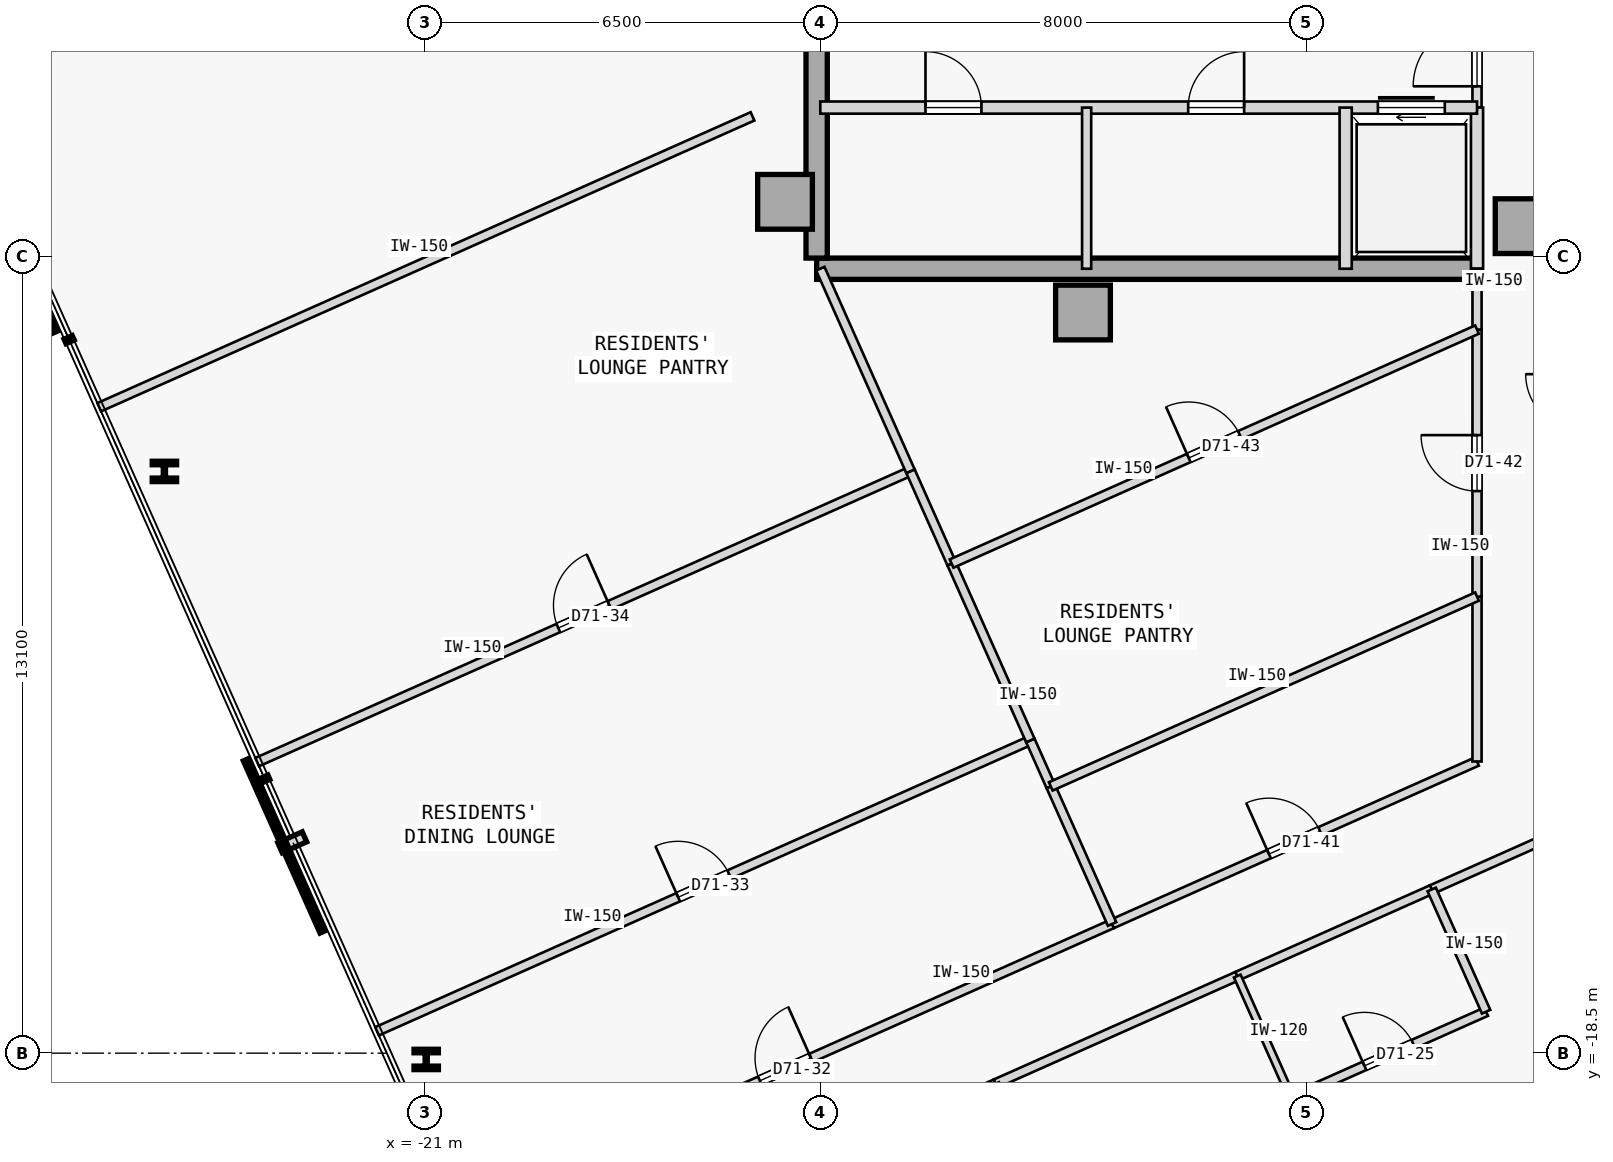
"""IFC4 building model, lengths in metres.
Left out: names, types, materials, properties, quantities, classifications, styles, units other than length and angle.
Written with IfcOpenShell. Run it as: python <this file> out.ifc"""

import sys

from ifc_helpers import new_model, si_unit, direction, frame, frame_2d, origin, origin_2d, place, context, subcontext, project, spatial, rectangle, i_section, extrude, element, fill, save


model = new_model("IFC4")
c1 = context("Model", 3, precision=1e-05, world=origin(), true_north=direction((0.0, 1.0)))
c2 = subcontext(c1, "Body", "Model", "MODEL_VIEW")
j1 = project(units=[si_unit("LENGTHUNIT", "METRE"), si_unit("PLANEANGLEUNIT", "RADIAN")], contexts=[c1])
p1 = place(None, origin())
s1 = spatial("IfcSite", under=j1, at=p1, CompositionType="ELEMENT")
p2 = place(p1, origin())
s2 = spatial("IfcBuilding", under=s1, at=p2, CompositionType="ELEMENT")
p3 = place(p2, frame((0.0, 0.0, 265.55)))
s3 = spatial("IfcBuildingStorey", under=s2, at=p3, CompositionType="ELEMENT", Elevation=265.55)
for number, where, z_axis, x_axis in (
    (1, (-15.08, -4.5, 0.0), (0.0, 0.0, 1.0), (1.0, 0.0, 0.0)),
    (2, (-10.18, -6.32, 0.0), (0.0, 0.0, 1.0), (1.0, 0.0, 0.0)),
    (3, (-2.95, -4.9, 0.0), (0.0, 0.0, 1.0), (1.0, 0.0, 0.0)),
):
    element("IfcColumn", number, at=place(p3, frame(where, z_axis=z_axis, x_axis=x_axis)), inside=s3, PredefinedType="COLUMN", context=c2, shape_type="SweptSolid", body=[
        extrude(rectangle(XDim=0.9, YDim=0.9, at=origin_2d()), origin(), (0.0, 0.0, 1.0), 3.35),
    ])
p4 = place(p3, frame((-14.56, -5.6, 0.0), z_axis=(0.0, 0.0, 1.0), x_axis=(1.0, 0.0, 0.0)))
e4 = element("IfcWall", 4, at=p4, inside=s3, PredefinedType="SHEAR", context=c2, shape_type="SweptSolid", body=[
    extrude(rectangle(XDim=10.86, YDim=0.35, at=frame_2d((5.43, 0.0))), origin(), (0.0, 0.0, 1.0), 3.125),
])
p5 = place(p3, frame((-14.56, -5.425, 0.0), z_axis=(0.0, 0.0, 1.0), x_axis=(0.0, 1.0, 0.0)))
e5 = element("IfcWall", 5, at=p5, inside=s3, PredefinedType="SHEAR", context=c2, shape_type="SweptSolid", body=[
    extrude(rectangle(XDim=10.85, YDim=0.35, at=frame_2d((5.425, 0.0))), origin(), (0.0, 0.0, 1.0), 3.125),
])
for number, where, z_axis, x_axis in (
    (6, (-25.286, -8.933, 0.0), (0.0, 0.0, 1.0), (1.0, 0.0, 0.0)),
    (7, (-20.981, -18.603, 0.0), (0.0, 0.0, 1.0), (1.0, 0.0, 0.0)),
):
    element("IfcColumn", number, at=place(p3, frame(where, z_axis=z_axis, x_axis=x_axis)), inside=s3, PredefinedType="COLUMN", context=c2, shape_type="SweptSolid", body=[
        extrude(i_section(OverallWidth=0.401, OverallDepth=0.335, WebThickness=0.036, FlangeThickness=0.058, FilletRadius=0.015, at=origin_2d()), origin(), (0.0, 0.0, 1.0), 3.35),
    ])
p6 = place(p3, frame((-3.7, -2.95, 0.0), z_axis=(0.0, 0.0, 1.0), x_axis=(0.0, 1.0, 0.0)))
e8 = element("IfcWall", 8, at=p6, inside=s3, PredefinedType="PARTITIONING", context=c2, shape_type="SweptSolid", body=[
    extrude(rectangle(XDim=1.8, YDim=0.15, at=frame_2d((0.9, 0.0))), origin(), (0.0, 0.0, 1.0), 3.125),
])
p7 = place(p6, frame((0.35, 0.0, 0.0)))
e9 = element("IfcOpeningElement", 9, at=p7, cuts=e8, PredefinedType="OPENING", context=c2, shape_type="SweptSolid", body=[
    extrude(rectangle(XDim=1.05, YDim=2.18, at=frame_2d((0.525, 1.09))), frame((0.0, 0.085, 0.0), z_axis=(0.0, -1.0, 0.0), x_axis=(1.0, 0.0, 0.0)), (0.0, 0.0, 1.0), 0.17),
])
p8 = place(p3, frame((-3.7, -5.6, 0.0), z_axis=(0.0, 0.0, 1.0), x_axis=(0.0, 1.0, 0.0)))
e10 = element("IfcWall", 10, at=p8, inside=s3, PredefinedType="STANDARD", context=c2, shape_type="SweptSolid", body=[
    extrude(rectangle(XDim=2.65, YDim=0.2, at=frame_2d((1.325, 0.0))), origin(), (0.0, 0.0, 1.0), 3.125),
])
p9 = place(p3, frame((-14.5, -2.95, 0.0), z_axis=(0.0, 0.0, 1.0), x_axis=(1.0, 0.0, 0.0)))
e11 = element("IfcWall", 11, at=p9, inside=s3, PredefinedType="STANDARD", context=c2, shape_type="SweptSolid", body=[
    extrude(rectangle(XDim=10.8, YDim=0.2, at=frame_2d((5.4, 0.0))), origin(), (0.0, 0.0, 1.0), 3.125),
])
p10 = place(p9, frame((9.17, 0.0, 0.0)))
e12 = element("IfcOpeningElement", 12, at=p10, cuts=e11, PredefinedType="OPENING", context=c2, shape_type="SweptSolid", body=[
    extrude(rectangle(XDim=1.1, YDim=2.15, at=frame_2d((0.55, 1.075))), frame((0.0, 0.11, 0.0), z_axis=(0.0, -1.0, 0.0), x_axis=(1.0, 0.0, 0.0)), (0.0, 0.0, 1.0), 0.22),
])
p11 = place(p9, frame((1.73, 0.0, 0.0)))
e13 = element("IfcOpeningElement", 13, at=p11, cuts=e11, PredefinedType="OPENING", context=c2, shape_type="SweptSolid", body=[
    extrude(rectangle(XDim=0.92, YDim=2.15, at=frame_2d((0.46, 1.075))), frame((0.0, 0.11, 0.0), z_axis=(0.0, -1.0, 0.0), x_axis=(1.0, 0.0, 0.0)), (0.0, 0.0, 1.0), 0.22),
])
p12 = place(p9, frame((6.05, 0.0, 0.0)))
e14 = element("IfcOpeningElement", 14, at=p12, cuts=e11, PredefinedType="OPENING", context=c2, shape_type="SweptSolid", body=[
    extrude(rectangle(XDim=0.92, YDim=2.15, at=frame_2d((0.46, 1.075))), frame((0.0, 0.11, 0.0), z_axis=(0.0, -1.0, 0.0), x_axis=(1.0, 0.0, 0.0)), (0.0, 0.0, 1.0), 0.22),
])
p13 = place(p3, frame((-5.86, -5.6, 0.0), z_axis=(0.0, 0.0, 1.0), x_axis=(0.0, 1.0, 0.0)))
e15 = element("IfcWall", 15, at=p13, inside=s3, PredefinedType="STANDARD", context=c2, shape_type="SweptSolid", body=[
    extrude(rectangle(XDim=2.65, YDim=0.2, at=frame_2d((1.325, 0.0))), origin(), (0.0, 0.0, 1.0), 3.125),
])
p14 = place(p3, frame((-10.12, -5.6, 0.0), z_axis=(0.0, 0.0, 1.0), x_axis=(0.0, 1.0, 0.0)))
e16 = element("IfcWall", 16, at=p14, inside=s3, PredefinedType="PARTITIONING", context=c2, shape_type="SweptSolid", body=[
    extrude(rectangle(XDim=2.65, YDim=0.15, at=frame_2d((1.325, 0.0))), origin(), (0.0, 0.0, 1.0), 3.125),
])
p15 = place(p3, frame((-4.445, -15.808, 0.0), z_axis=(0.0, 0.0, 1.0), x_axis=(0.913546853922, 0.406733506966, 0.0)))
e17 = element("IfcWall", 17, at=p15, inside=s3, PredefinedType="PARTITIONING", context=c2, shape_type="SweptSolid", body=[
    extrude(rectangle(XDim=12.751, YDim=0.15, at=frame_2d((6.375, 0.0))), origin(), (0.0, 0.0, 1.0), 3.125),
])
p16 = place(p15, frame((5.9, 0.0, 0.0)))
e18 = element("IfcOpeningElement", 18, at=p16, cuts=e17, PredefinedType="OPENING", context=c2, shape_type="SweptSolid", body=[
    extrude(rectangle(XDim=0.95, YDim=2.15, at=frame_2d((0.475, 1.075))), frame((0.0, 0.085, 0.0), z_axis=(0.0, -1.0, 0.0), x_axis=(1.0, 0.0, 0.0)), (0.0, 0.0, 1.0), 0.17),
])
p17 = place(p3, frame((-13.763, -19.957, 0.0), z_axis=(0.0, 0.0, 1.0), x_axis=(0.913541436194, 0.406745675276, 0.0)))
e19 = element("IfcWall", 19, at=p17, inside=s3, PredefinedType="PARTITIONING", context=c2, shape_type="SweptSolid", body=[
    extrude(rectangle(XDim=2.35, YDim=0.15, at=frame_2d((1.175, 0.0))), origin(), (0.0, 0.0, 1.0), 3.125),
])
p18 = place(p3, frame((-11.616, -19.001, 0.0), z_axis=(0.0, 0.0, 1.0), x_axis=(0.913545193015, 0.406737237438, 0.0)))
e20 = element("IfcWall", 20, at=p18, inside=s3, PredefinedType="PARTITIONING", context=c2, shape_type="SweptSolid", body=[
    extrude(rectangle(XDim=4.35, YDim=0.15, at=frame_2d((2.175, 0.0))), origin(), (0.0, 0.0, 1.0), 3.125),
])
p19 = place(p3, frame((-7.643, -17.232, 0.0), z_axis=(0.0, 0.0, 1.0), x_axis=(0.913549606868, 0.406727323635, 0.0)))
e21 = element("IfcWall", 21, at=p19, inside=s3, PredefinedType="PARTITIONING", context=c2, shape_type="SweptSolid", body=[
    extrude(rectangle(XDim=3.5, YDim=0.15, at=frame_2d((1.75, 0.0))), origin(), (0.0, 0.0, 1.0), 3.125),
])
p20 = place(p3, frame((-20.445, -21.159, 0.0), z_axis=(0.0, 0.0, 1.0), x_axis=(0.913547681516, 0.406731648137, 0.0)))
e22 = element("IfcWall", 22, at=p20, inside=s3, PredefinedType="PARTITIONING", context=c2, shape_type="SweptSolid", body=[
    extrude(rectangle(XDim=11.76, YDim=0.15, at=frame_2d((5.88, 0.0))), origin(), (0.0, 0.0, 1.0), 3.125),
])
p21 = place(p20, frame((5.42, 0.0, 0.0)))
e23 = element("IfcOpeningElement", 23, at=p21, cuts=e22, PredefinedType="OPENING", context=c2, shape_type="SweptSolid", body=[
    extrude(rectangle(XDim=0.92, YDim=2.15, at=frame_2d((0.46, 1.075))), frame((0.0, 0.085, 0.0), z_axis=(0.0, -1.0, 0.0), x_axis=(1.0, 0.0, 0.0)), (0.0, 0.0, 1.0), 0.17),
])
p22 = place(p3, frame((-9.702, -16.375, 0.0), z_axis=(0.0, 0.0, 1.0), x_axis=(0.913552389019, 0.406721074594, 0.0)))
e24 = element("IfcWall", 24, at=p22, inside=s3, PredefinedType="PARTITIONING", context=c2, shape_type="SweptSolid", body=[
    extrude(rectangle(XDim=6.57, YDim=0.15, at=frame_2d((3.285, 0.0))), origin(), (0.0, 0.0, 1.0), 3.125),
])
p23 = place(p22, frame((2.825, 0.0, 0.0)))
e25 = element("IfcOpeningElement", 25, at=p23, cuts=e24, PredefinedType="OPENING", context=c2, shape_type="SweptSolid", body=[
    extrude(rectangle(XDim=0.92, YDim=2.15, at=frame_2d((0.46, 1.075))), frame((0.0, 0.085, 0.0), z_axis=(0.0, -1.0, 0.0), x_axis=(1.0, 0.0, 0.0)), (0.0, 0.0, 1.0), 0.17),
])
p24 = place(p3, frame((-3.7, -13.703, 0.0), z_axis=(0.0, 0.0, 1.0), x_axis=(9.0033312e-05, 0.999999995947, 0.0)))
e26 = element("IfcWall", 26, at=p24, inside=s3, PredefinedType="PARTITIONING", context=c2, shape_type="SweptSolid", body=[
    extrude(rectangle(XDim=2.712, YDim=0.15, at=frame_2d((1.356, 0.0))), origin(), (0.0, 0.0, 1.0), 3.125),
])
p25 = place(p3, frame((-3.7, -10.992, 0.0), z_axis=(0.0, 0.0, 1.0), x_axis=(0.0, 1.0, 0.0)))
e27 = element("IfcWall", 27, at=p25, inside=s3, PredefinedType="PARTITIONING", context=c2, shape_type="SweptSolid", body=[
    extrude(rectangle(XDim=4.391, YDim=0.15, at=frame_2d((2.195, 0.0))), origin(), (0.0, 0.0, 1.0), 3.125),
])
p26 = place(p25, frame((1.735, 0.0, 0.0)))
e28 = element("IfcOpeningElement", 28, at=p26, cuts=e27, PredefinedType="OPENING", context=c2, shape_type="SweptSolid", body=[
    extrude(rectangle(XDim=0.92, YDim=2.15, at=frame_2d((0.46, 1.075))), frame((0.0, 0.085, 0.0), z_axis=(0.0, -1.0, 0.0), x_axis=(1.0, 0.0, 0.0)), (0.0, 0.0, 1.0), 0.17),
])
p27 = place(p3, frame((-3.7, -6.601, 0.0), z_axis=(0.0, 0.0, 1.0), x_axis=(-0.000243783513, 0.999999970285, 0.0)))
e29 = element("IfcWall", 29, at=p27, inside=s3, PredefinedType="PARTITIONING", context=c2, shape_type="SweptSolid", body=[
    extrude(rectangle(XDim=1.001, YDim=0.15, at=frame_2d((0.501, 0.0))), origin(), (0.0, 0.0, 1.0), 3.125),
])
p28 = place(p3, frame((-6.748, -19.242, 0.0), z_axis=(0.0, 0.0, 1.0), x_axis=(0.913549606868, 0.406727323635, 0.0)))
e30 = element("IfcWall", 30, at=p28, inside=s3, PredefinedType="PARTITIONING", context=c2, shape_type="SweptSolid", body=[
    extrude(rectangle(XDim=3.5, YDim=0.15, at=frame_2d((1.75, 0.0))), origin(), (0.0, 0.0, 1.0), 3.125),
])
p29 = place(p28, frame((1.31, 0.0, 0.0)))
e31 = element("IfcOpeningElement", 31, at=p29, cuts=e30, PredefinedType="OPENING", context=c2, shape_type="SweptSolid", body=[
    extrude(rectangle(XDim=0.88, YDim=2.15, at=frame_2d((0.44, 1.075))), frame((0.0, 0.085, 0.0), z_axis=(0.0, -1.0, 0.0), x_axis=(1.0, 0.0, 0.0)), (0.0, 0.0, 1.0), 0.17),
])
p30 = place(p3, frame((-3.55, -17.818, 0.0), z_axis=(0.0, 0.0, 1.0), x_axis=(-0.406725294076, 0.913550510459, 0.0)))
e32 = element("IfcWall", 32, at=p30, inside=s3, PredefinedType="PARTITIONING", context=c2, shape_type="SweptSolid", body=[
    extrude(rectangle(XDim=2.2, YDim=0.15, at=frame_2d((1.1, 0.0))), origin(), (0.0, 0.0, 1.0), 3.125),
])
for number, where, z_axis, x_axis in (
    (33, (-10.722, -21.011, 0.0), (0.0, 0.0, 1.0), (-0.407, 0.914, 0.0)),
    (34, (-6.748, -19.242, 0.0), (0.0, 0.0, 1.0), (-0.407, 0.914, 0.0)),
):
    element("IfcWall", number, at=place(p3, frame(where, z_axis=z_axis, x_axis=x_axis)), inside=s3, PredefinedType="PARTITIONING", context=c2, shape_type="SweptSolid", body=[
        extrude(rectangle(XDim=2.2, YDim=0.12, at=frame_2d((1.1, 0.0))), origin(), (0.0, 0.0, 1.0), 3.125),
    ])
p31 = place(p3, frame((-21.789, -18.14, 0.0), z_axis=(0.0, 0.0, 1.0), x_axis=(0.913544247064, 0.406739362069, 0.0)))
e35 = element("IfcWall", 35, at=p31, inside=s3, PredefinedType="PARTITIONING", context=c2, shape_type="SweptSolid", body=[
    extrude(rectangle(XDim=11.76, YDim=0.15, at=frame_2d((5.88, 0.0))), origin(), (0.0, 0.0, 1.0), 3.125),
])
p32 = place(p31, frame((5.42, 0.0, 0.0)))
e36 = element("IfcOpeningElement", 36, at=p32, cuts=e35, PredefinedType="OPENING", context=c2, shape_type="SweptSolid", body=[
    extrude(rectangle(XDim=0.92, YDim=2.15, at=frame_2d((0.46, 1.075))), frame((0.0, 0.085, 0.0), z_axis=(0.0, -1.0, 0.0), x_axis=(1.0, 0.0, 0.0)), (0.0, 0.0, 1.0), 0.17),
])
p33 = place(p3, frame((-9.702, -16.375, 0.0), z_axis=(0.0, 0.0, 1.0), x_axis=(-0.406787689018, 0.913522728816, 0.0)))
e37 = element("IfcWall", 37, at=p33, inside=s3, PredefinedType="PARTITIONING", context=c2, shape_type="SweptSolid", body=[
    extrude(rectangle(XDim=2.477, YDim=0.15, at=frame_2d((1.238, 0.0))), origin(), (0.0, 0.0, 1.0), 3.125),
])
p34 = place(p3, frame((-10.709, -14.113, 0.0), z_axis=(0.0, 0.0, 1.0), x_axis=(-0.406740884734, 0.913543569123, 0.0)))
e38 = element("IfcWall", 38, at=p34, inside=s3, PredefinedType="PARTITIONING", context=c2, shape_type="SweptSolid", body=[
    extrude(rectangle(XDim=0.827, YDim=0.15, at=frame_2d((0.414, 0.0))), origin(), (0.0, 0.0, 1.0), 3.125),
])
p35 = place(p3, frame((-23.76, -13.713, 0.0), z_axis=(0.0, 0.0, 1.0), x_axis=(0.913544247064, 0.406739362069, 0.0)))
e39 = element("IfcWall", 39, at=p35, inside=s3, PredefinedType="PARTITIONING", context=c2, shape_type="SweptSolid", body=[
    extrude(rectangle(XDim=11.76, YDim=0.15, at=frame_2d((5.88, 0.0))), origin(), (0.0, 0.0, 1.0), 3.125),
])
p36 = place(p35, frame((5.42, 0.0, 0.0)))
e40 = element("IfcOpeningElement", 40, at=p36, cuts=e39, PredefinedType="OPENING", context=c2, shape_type="SweptSolid", body=[
    extrude(rectangle(XDim=0.92, YDim=2.15, at=frame_2d((0.46, 1.075))), frame((0.0, 0.085, 0.0), z_axis=(0.0, -1.0, 0.0), x_axis=(1.0, 0.0, 0.0)), (0.0, 0.0, 1.0), 0.17),
])
p37 = place(p3, frame((-11.046, -13.357, 0.0), z_axis=(0.0, 0.0, 1.0), x_axis=(-0.406707553978, 0.913558408388, 0.0)))
e41 = element("IfcWall", 41, at=p37, inside=s3, PredefinedType="PARTITIONING", context=c2, shape_type="SweptSolid", body=[
    extrude(rectangle(XDim=3.184, YDim=0.15, at=frame_2d((1.592, 0.0))), origin(), (0.0, 0.0, 1.0), 3.125),
])
p38 = place(p3, frame((-12.341, -10.448, 0.0), z_axis=(0.0, 0.0, 1.0), x_axis=(-0.406751698222, 0.913538754511, 0.0)))
e42 = element("IfcWall", 42, at=p38, inside=s3, PredefinedType="PARTITIONING", context=c2, shape_type="SweptSolid", body=[
    extrude(rectangle(XDim=1.662, YDim=0.15, at=frame_2d((0.831, 0.0))), origin(), (0.0, 0.0, 1.0), 3.125),
])
p39 = place(p3, frame((-26.358, -7.878, 0.0), z_axis=(0.0, 0.0, 1.0), x_axis=(0.913547681516, 0.406731648137, 0.0)))
e43 = element("IfcWall", 43, at=p39, inside=s3, PredefinedType="PARTITIONING", context=c2, shape_type="SweptSolid", body=[
    extrude(rectangle(XDim=11.76, YDim=0.15, at=frame_2d((5.88, 0.0))), origin(), (0.0, 0.0, 1.0), 3.125),
])
p40 = place(p3, frame((-13.017, -8.93, 0.0), z_axis=(0.0, 0.0, 1.0), x_axis=(-0.406722395322, 0.913551801018, 0.0)))
e44 = element("IfcWall", 44, at=p40, inside=s3, PredefinedType="PARTITIONING", context=c2, shape_type="SweptSolid", body=[
    extrude(rectangle(XDim=3.646, YDim=0.15, at=frame_2d((1.823, 0.0))), origin(), (0.0, 0.0, 1.0), 3.125),
])
p41 = place(p3, frame((-10.709, -14.113, 0.0), z_axis=(0.0, 0.0, 1.0), x_axis=(0.91353843513, 0.40675241553, 0.0)))
e45 = element("IfcWall", 45, at=p41, inside=s3, PredefinedType="PARTITIONING", context=c2, shape_type="SweptSolid", body=[
    extrude(rectangle(XDim=7.673, YDim=0.15, at=frame_2d((3.836, 0.0))), origin(), (0.0, 0.0, 1.0), 3.125),
])
p42 = place(p3, frame((-12.341, -10.448, 0.0), z_axis=(0.0, 0.0, 1.0), x_axis=(0.913539934271, 0.406749048544, 0.0)))
e46 = element("IfcWall", 46, at=p42, inside=s3, PredefinedType="PARTITIONING", context=c2, shape_type="SweptSolid", body=[
    extrude(rectangle(XDim=9.459, YDim=0.15, at=frame_2d((4.729, 0.0))), origin(), (0.0, 0.0, 1.0), 3.125),
])
p43 = place(p42, frame((4.27, 0.0, 0.0)))
e47 = element("IfcOpeningElement", 47, at=p43, cuts=e46, PredefinedType="OPENING", context=c2, shape_type="SweptSolid", body=[
    extrude(rectangle(XDim=0.92, YDim=2.15, at=frame_2d((0.46, 1.075))), frame((0.0, 0.085, 0.0), z_axis=(0.0, -1.0, 0.0), x_axis=(1.0, 0.0, 0.0)), (0.0, 0.0, 1.0), 0.17),
])
p44 = place(p7, origin())
e48 = element("IfcDoor", 48, at=p44, inside=s3, OperationType="SINGLE_SWING_LEFT", PredefinedType="DOOR", context=c2, shape_type="SweptSolid", body=[
    extrude(rectangle(XDim=1.05, YDim=2.18, at=frame_2d((0.525, 1.09))), frame((0.0, 0.025, 0.0), z_axis=(0.0, -1.0, 0.0), x_axis=(1.0, 0.0, 0.0)), (0.0, 0.0, 1.0), 0.05),
])
fill(e9, e48)
p45 = place(p10, origin())
e49 = element("IfcDoor", 49, at=p45, inside=s3, OperationType="SLIDING_TO_RIGHT", PredefinedType="DOOR", context=c2, shape_type="SweptSolid", body=[
    extrude(rectangle(XDim=1.1, YDim=2.15, at=frame_2d((0.55, 1.075))), frame((0.0, 0.025, 0.0), z_axis=(0.0, -1.0, 0.0), x_axis=(1.0, 0.0, 0.0)), (0.0, 0.0, 1.0), 0.05),
])
fill(e12, e49)
p46 = place(p11, origin())
e50 = element("IfcDoor", 50, at=p46, inside=s3, OperationType="SINGLE_SWING_LEFT", PredefinedType="DOOR", context=c2, shape_type="SweptSolid", body=[
    extrude(rectangle(XDim=0.92, YDim=2.15, at=frame_2d((0.46, 1.075))), frame((0.0, 0.025, 0.0), z_axis=(0.0, -1.0, 0.0), x_axis=(1.0, 0.0, 0.0)), (0.0, 0.0, 1.0), 0.05),
])
fill(e13, e50)
p47 = place(p12, origin())
e51 = element("IfcDoor", 51, at=p47, inside=s3, OperationType="SINGLE_SWING_RIGHT", PredefinedType="DOOR", context=c2, shape_type="SweptSolid", body=[
    extrude(rectangle(XDim=0.92, YDim=2.15, at=frame_2d((0.46, 1.075))), frame((0.0, 0.025, 0.0), z_axis=(0.0, -1.0, 0.0), x_axis=(1.0, 0.0, 0.0)), (0.0, 0.0, 1.0), 0.05),
])
fill(e14, e51)
p48 = place(p29, origin())
e52 = element("IfcDoor", 52, at=p48, inside=s3, OperationType="SINGLE_SWING_LEFT", PredefinedType="DOOR", context=c2, shape_type="SweptSolid", body=[
    extrude(rectangle(XDim=0.88, YDim=2.15, at=frame_2d((0.44, 1.075))), frame((0.0, 0.025, 0.0), z_axis=(0.0, -1.0, 0.0), x_axis=(1.0, 0.0, 0.0)), (0.0, 0.0, 1.0), 0.05),
])
fill(e31, e52)
p49 = place(p21, origin())
e53 = element("IfcDoor", 53, at=p49, inside=s3, OperationType="SINGLE_SWING_RIGHT", PredefinedType="DOOR", context=c2, shape_type="SweptSolid", body=[
    extrude(rectangle(XDim=0.92, YDim=2.15, at=frame_2d((0.46, 1.075))), frame((0.0, 0.025, 0.0), z_axis=(0.0, -1.0, 0.0), x_axis=(1.0, 0.0, 0.0)), (0.0, 0.0, 1.0), 0.05),
])
fill(e23, e53)
p50 = place(p32, origin())
e54 = element("IfcDoor", 54, at=p50, inside=s3, OperationType="SINGLE_SWING_LEFT", PredefinedType="DOOR", context=c2, shape_type="SweptSolid", body=[
    extrude(rectangle(XDim=0.92, YDim=2.15, at=frame_2d((0.46, 1.075))), frame((0.0, 0.025, 0.0), z_axis=(0.0, -1.0, 0.0), x_axis=(1.0, 0.0, 0.0)), (0.0, 0.0, 1.0), 0.05),
])
fill(e36, e54)
p51 = place(p36, origin())
e55 = element("IfcDoor", 55, at=p51, inside=s3, OperationType="SINGLE_SWING_RIGHT", PredefinedType="DOOR", context=c2, shape_type="SweptSolid", body=[
    extrude(rectangle(XDim=0.92, YDim=2.15, at=frame_2d((0.46, 1.075))), frame((0.0, 0.025, 0.0), z_axis=(0.0, -1.0, 0.0), x_axis=(1.0, 0.0, 0.0)), (0.0, 0.0, 1.0), 0.05),
])
fill(e40, e55)
p52 = place(p23, origin())
e56 = element("IfcDoor", 56, at=p52, inside=s3, OperationType="SINGLE_SWING_LEFT", PredefinedType="DOOR", context=c2, shape_type="SweptSolid", body=[
    extrude(rectangle(XDim=0.92, YDim=2.15, at=frame_2d((0.46, 1.075))), frame((0.0, 0.025, 0.0), z_axis=(0.0, -1.0, 0.0), x_axis=(1.0, 0.0, 0.0)), (0.0, 0.0, 1.0), 0.05),
])
fill(e25, e56)
p53 = place(p26, origin())
e57 = element("IfcDoor", 57, at=p53, inside=s3, OperationType="SINGLE_SWING_RIGHT", PredefinedType="DOOR", context=c2, shape_type="SweptSolid", body=[
    extrude(rectangle(XDim=0.92, YDim=2.15, at=frame_2d((0.46, 1.075))), frame((0.0, 0.025, 0.0), z_axis=(0.0, -1.0, 0.0), x_axis=(1.0, 0.0, 0.0)), (0.0, 0.0, 1.0), 0.05),
])
fill(e28, e57)
p54 = place(p43, origin())
e58 = element("IfcDoor", 58, at=p54, inside=s3, OperationType="SINGLE_SWING_LEFT", PredefinedType="DOOR", context=c2, shape_type="SweptSolid", body=[
    extrude(rectangle(XDim=0.92, YDim=2.15, at=frame_2d((0.46, 1.075))), frame((0.0, 0.025, 0.0), z_axis=(0.0, -1.0, 0.0), x_axis=(1.0, 0.0, 0.0)), (0.0, 0.0, 1.0), 0.05),
])
fill(e47, e58)
save(model, sys.argv[1])
